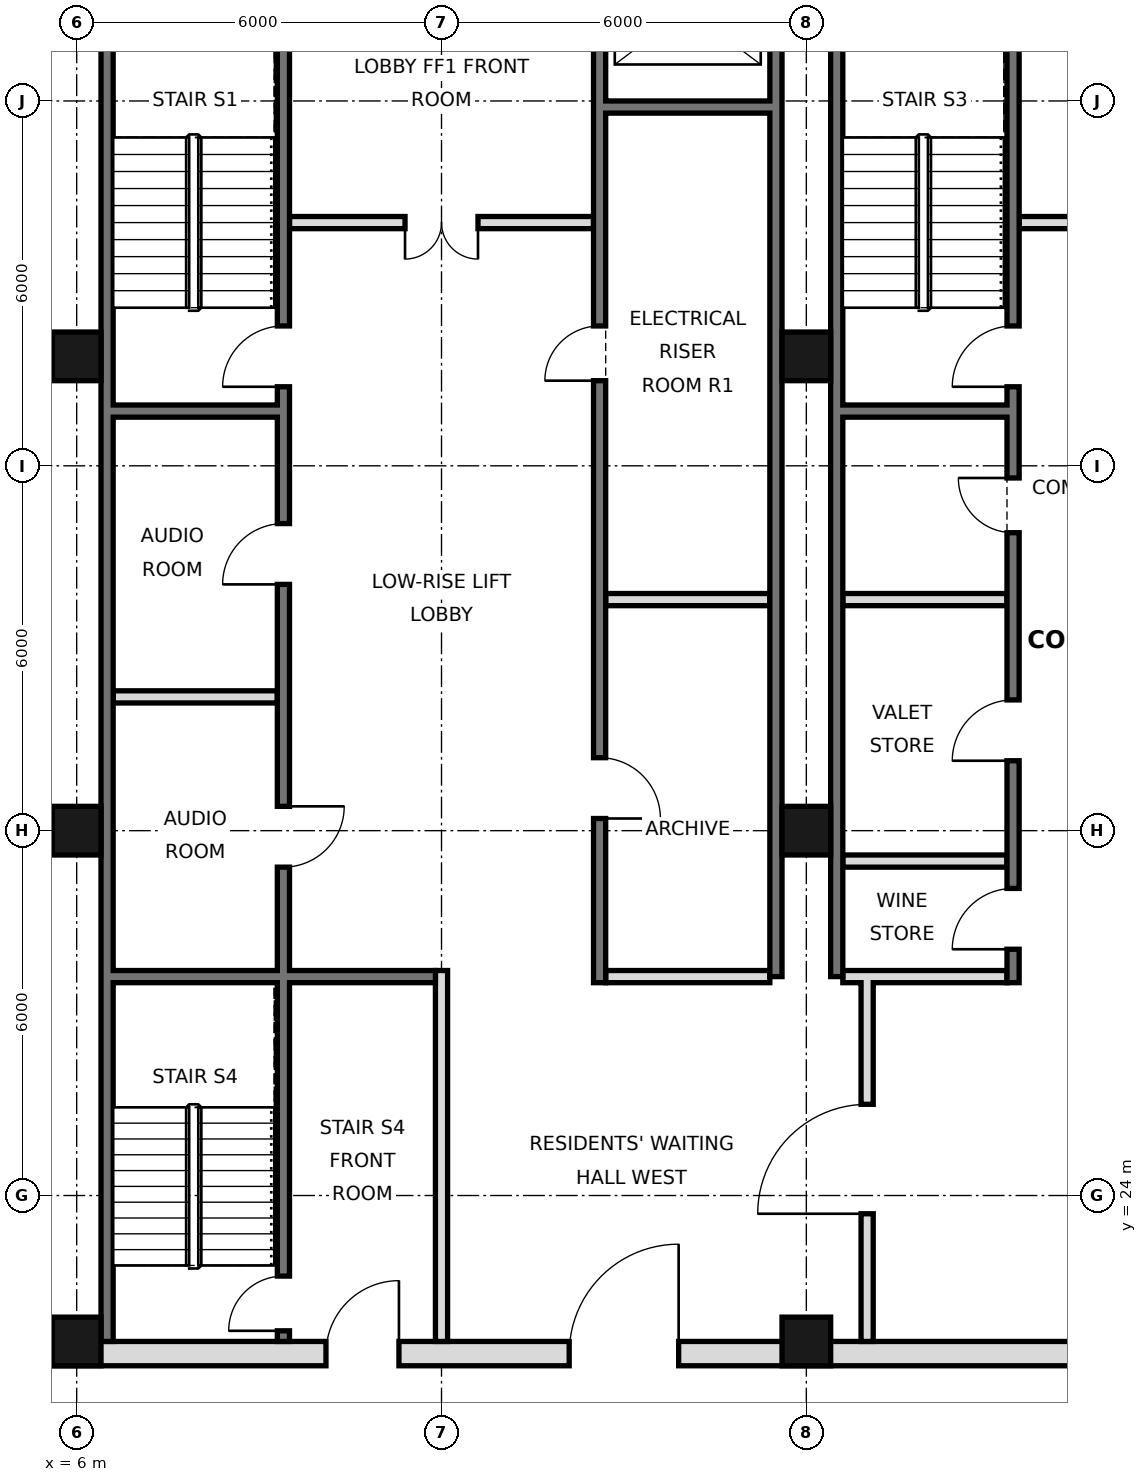
"""IFC4 building model, lengths in metres.
Left out: names, types, materials, properties, quantities, classifications, styles, units other than length and angle.
Written with IfcOpenShell. Run it as: python <this file> out.ifc"""

import sys

from ifc_helpers import new_model, si_unit, direction, frame, frame_2d, origin, origin_2d, place, context, subcontext, project, spatial, rectangle, hollow_rectangle, extrude, element, fill, save


model = new_model("IFC4")
c1 = context("Model", 3, precision=1e-05, world=origin(), true_north=direction((0.0, 1.0)))
c2 = subcontext(c1, "Body", "Model", "MODEL_VIEW")
j1 = project(units=[si_unit("LENGTHUNIT", "METRE"), si_unit("PLANEANGLEUNIT", "RADIAN")], contexts=[c1])
p1 = place(None, origin())
s1 = spatial("IfcSite", under=j1, at=p1, CompositionType="ELEMENT")
p2 = place(p1, origin())
s2 = spatial("IfcBuilding", under=s1, at=p2, CompositionType="ELEMENT")
p3 = place(p2, frame((0.0, 0.0, 239.6)))
s3 = spatial("IfcBuildingStorey", under=s2, at=p3, CompositionType="ELEMENT", Elevation=239.6)
for number, where, z_axis, x_axis in (
    (1, (6.0, 21.6, 0.0), (0.0, 0.0, 1.0), (1.0, 0.0, 0.0)),
    (2, (6.0, 30.0, 0.0), (0.0, 0.0, 1.0), (1.0, 0.0, 0.0)),
    (3, (6.0, 37.8, 0.0), (0.0, 0.0, 1.0), (1.0, 0.0, 0.0)),
    (4, (18.0, 21.6, 0.0), (0.0, 0.0, 1.0), (1.0, 0.0, 0.0)),
    (5, (18.0, 30.0, 0.0), (0.0, 0.0, 1.0), (1.0, 0.0, 0.0)),
    (6, (18.0, 37.8, 0.0), (0.0, 0.0, 1.0), (1.0, 0.0, 0.0)),
):
    element("IfcColumn", number, at=place(p3, frame(where, z_axis=z_axis, x_axis=x_axis)), inside=s3, PredefinedType="COLUMN", context=c2, shape_type="SweptSolid", body=[
        extrude(hollow_rectangle(XDim=0.8, YDim=0.8, WallThickness=0.04, at=origin_2d()), origin(), (0.0, 0.0, 1.0), 3.6),
    ])
p4 = place(p3, frame((6.5, 21.6, 0.0), z_axis=(0.0, 0.0, 1.0), x_axis=(0.0, 1.0, 0.0)))
e7 = element("IfcWall", 7, at=p4, inside=s3, PredefinedType="SOLIDWALL", context=c2, shape_type="SweptSolid", body=[
    extrude(rectangle(XDim=23.5, YDim=0.2, at=frame_2d((11.75, 0.0))), origin(), (0.0, 0.0, 1.0), 3.42),
])
for number, where, z_axis, x_axis in (
    (8, (17.5, 27.6, 0.0), (0.0, 0.0, 1.0), (0.0, 1.0, 0.0)),
    (9, (18.5, 27.6, 0.0), (0.0, 0.0, 1.0), (0.0, 1.0, 0.0)),
):
    element("IfcWall", number, at=place(p3, frame(where, z_axis=z_axis, x_axis=x_axis)), inside=s3, PredefinedType="SOLIDWALL", context=c2, shape_type="SweptSolid", body=[
        extrude(rectangle(XDim=17.5, YDim=0.2, at=frame_2d((8.75, 0.0))), origin(), (0.0, 0.0, 1.0), 3.42),
    ])
p5 = place(p3, frame((5.6, 21.4, 0.0), z_axis=(0.0, 0.0, 1.0), x_axis=(1.0, 0.0, 0.0)))
e10 = element("IfcWall", 10, at=p5, inside=s3, PredefinedType="SOLIDWALL", context=c2, shape_type="SweptSolid", body=[
    extrude(rectangle(XDim=36.8, YDim=0.4, at=frame_2d((18.4, 0.0))), origin(), (0.0, 0.0, 1.0), 3.42),
])
p6 = place(p5, frame((8.5, 0.0, 0.0)))
e11 = element("IfcOpeningElement", 11, at=p6, cuts=e10, PredefinedType="OPENING", context=c2, shape_type="SweptSolid", body=[
    extrude(rectangle(XDim=1.8, YDim=2.1, at=frame_2d((0.9, 1.05))), frame((0.0, 0.21, 0.0), z_axis=(0.0, -1.0, 0.0), x_axis=(1.0, 0.0, 0.0)), (0.0, 0.0, 1.0), 0.42),
])
p7 = place(p5, frame((17.5, 0.0, 0.0)))
e12 = element("IfcOpeningElement", 12, at=p7, cuts=e10, PredefinedType="OPENING", context=c2, shape_type="SweptSolid", body=[
    extrude(rectangle(XDim=1.8, YDim=2.1, at=frame_2d((0.9, 1.05))), frame((0.0, 0.21, 0.0), z_axis=(0.0, -1.0, 0.0), x_axis=(1.0, 0.0, 0.0)), (0.0, 0.0, 1.0), 0.42),
])
p8 = place(p5, frame((26.5, 0.0, 0.0)))
e13 = element("IfcOpeningElement", 13, at=p8, cuts=e10, PredefinedType="OPENING", context=c2, shape_type="SweptSolid", body=[
    extrude(rectangle(XDim=1.8, YDim=2.1, at=frame_2d((0.9, 1.05))), frame((0.0, 0.21, 0.0), z_axis=(0.0, -1.0, 0.0), x_axis=(1.0, 0.0, 0.0)), (0.0, 0.0, 1.0), 0.42),
])
p9 = place(p5, frame((4.5, 0.0, 0.0)))
e14 = element("IfcOpeningElement", 14, at=p9, cuts=e10, PredefinedType="OPENING", context=c2, shape_type="SweptSolid", body=[
    extrude(rectangle(XDim=1.2, YDim=2.1, at=frame_2d((0.6, 1.05))), frame((0.0, 0.21, 0.0), z_axis=(0.0, -1.0, 0.0), x_axis=(1.0, 0.0, 0.0)), (0.0, 0.0, 1.0), 0.42),
])
p10 = place(p5, frame((31.1, 0.0, 0.0)))
e15 = element("IfcOpeningElement", 15, at=p10, cuts=e10, PredefinedType="OPENING", context=c2, shape_type="SweptSolid", body=[
    extrude(rectangle(XDim=1.2, YDim=2.1, at=frame_2d((0.6, 1.05))), frame((0.0, 0.21, 0.0), z_axis=(0.0, -1.0, 0.0), x_axis=(1.0, 0.0, 0.0)), (0.0, 0.0, 1.0), 0.42),
])
p11 = place(p3, frame((19.0, 21.6, 0.0), z_axis=(0.0, 0.0, 1.0), x_axis=(0.0, 1.0, 0.0)))
e16 = element("IfcWall", 16, at=p11, inside=s3, PredefinedType="PARTITIONING", context=c2, shape_type="SweptSolid", body=[
    extrude(rectangle(XDim=6.0, YDim=0.2, at=frame_2d((3.0, 0.0))), origin(), (0.0, 0.0, 1.0), 3.42),
])
p12 = place(p11, frame((2.1, 0.0, 0.0)))
e17 = element("IfcOpeningElement", 17, at=p12, cuts=e16, PredefinedType="OPENING", context=c2, shape_type="SweptSolid", body=[
    extrude(rectangle(XDim=1.8, YDim=2.1, at=frame_2d((0.9, 1.05))), frame((0.0, 0.11, 0.0), z_axis=(0.0, -1.0, 0.0), x_axis=(1.0, 0.0, 0.0)), (0.0, 0.0, 1.0), 0.22),
])
p13 = place(p3, frame((12.0, 21.6, 0.0), z_axis=(0.0, 0.0, 1.0), x_axis=(0.0, 1.0, 0.0)))
e18 = element("IfcWall", 18, at=p13, inside=s3, PredefinedType="PARTITIONING", context=c2, shape_type="SweptSolid", body=[
    extrude(rectangle(XDim=6.1, YDim=0.2, at=frame_2d((3.05, 0.0))), origin(), (0.0, 0.0, 1.0), 3.42),
])
p14 = place(p3, frame((14.6, 27.5, 0.0), z_axis=(0.0, 0.0, 1.0), x_axis=(0.0, 1.0, 0.0)))
e19 = element("IfcWall", 19, at=p14, inside=s3, PredefinedType="SOLIDWALL", context=c2, shape_type="SweptSolid", body=[
    extrude(rectangle(XDim=17.5, YDim=0.2, at=frame_2d((8.75, 0.0))), origin(), (0.0, 0.0, 1.0), 3.42),
])
p15 = place(p14, frame((15.4, 0.0, 0.0)))
e20 = element("IfcOpeningElement", 20, at=p15, cuts=e19, PredefinedType="OPENING", context=c2, shape_type="SweptSolid", body=[
    extrude(rectangle(XDim=1.1, YDim=2.1, at=frame_2d((0.55, 1.05))), frame((0.0, 0.11, 0.0), z_axis=(0.0, -1.0, 0.0), x_axis=(1.0, 0.0, 0.0)), (0.0, 0.0, 1.0), 0.22),
])
p16 = place(p14, frame((2.7, 0.0, 0.0)))
e21 = element("IfcOpeningElement", 21, at=p16, cuts=e19, PredefinedType="OPENING", context=c2, shape_type="SweptSolid", body=[
    extrude(rectangle(XDim=1.0, YDim=2.1, at=frame_2d((0.5, 1.05))), frame((0.0, 0.11, 0.0), z_axis=(0.0, -1.0, 0.0), x_axis=(1.0, 0.0, 0.0)), (0.0, 0.0, 1.0), 0.22),
])
p17 = place(p14, frame((9.9, 0.0, 0.0)))
e22 = element("IfcOpeningElement", 22, at=p17, cuts=e19, PredefinedType="OPENING", context=c2, shape_type="SweptSolid", body=[
    extrude(rectangle(XDim=0.9, YDim=2.1, at=frame_2d((0.45, 1.05))), frame((0.0, 0.11, 0.0), z_axis=(0.0, -1.0, 0.0), x_axis=(1.0, 0.0, 0.0)), (0.0, 0.0, 1.0), 0.22),
])
p18 = place(p3, frame((21.4, 27.5, 0.0), z_axis=(0.0, 0.0, 1.0), x_axis=(0.0, 1.0, 0.0)))
e23 = element("IfcWall", 23, at=p18, inside=s3, PredefinedType="SOLIDWALL", context=c2, shape_type="SweptSolid", body=[
    extrude(rectangle(XDim=17.5, YDim=0.2, at=frame_2d((8.75, 0.0))), origin(), (0.0, 0.0, 1.0), 3.42),
])
p19 = place(p18, frame((0.55, 0.0, 0.0)))
e24 = element("IfcOpeningElement", 24, at=p19, cuts=e23, PredefinedType="OPENING", context=c2, shape_type="SweptSolid", body=[
    extrude(rectangle(XDim=1.0, YDim=2.1, at=frame_2d((0.5, 1.05))), frame((0.0, 0.11, 0.0), z_axis=(0.0, -1.0, 0.0), x_axis=(1.0, 0.0, 0.0)), (0.0, 0.0, 1.0), 0.22),
])
p20 = place(p18, frame((3.65, 0.0, 0.0)))
e25 = element("IfcOpeningElement", 25, at=p20, cuts=e23, PredefinedType="OPENING", context=c2, shape_type="SweptSolid", body=[
    extrude(rectangle(XDim=1.0, YDim=2.1, at=frame_2d((0.5, 1.05))), frame((0.0, 0.11, 0.0), z_axis=(0.0, -1.0, 0.0), x_axis=(1.0, 0.0, 0.0)), (0.0, 0.0, 1.0), 0.22),
])
p21 = place(p18, frame((9.8, 0.0, 0.0)))
e26 = element("IfcOpeningElement", 26, at=p21, cuts=e23, PredefinedType="OPENING", context=c2, shape_type="SweptSolid", body=[
    extrude(rectangle(XDim=1.0, YDim=2.1, at=frame_2d((0.5, 1.05))), frame((0.0, 0.11, 0.0), z_axis=(0.0, -1.0, 0.0), x_axis=(1.0, 0.0, 0.0)), (0.0, 0.0, 1.0), 0.22),
])
p22 = place(p18, frame((7.4, 0.0, 0.0)))
e27 = element("IfcOpeningElement", 27, at=p22, cuts=e23, PredefinedType="OPENING", context=c2, shape_type="SweptSolid", body=[
    extrude(rectangle(XDim=0.9, YDim=2.1, at=frame_2d((0.45, 1.05))), frame((0.0, 0.11, 0.0), z_axis=(0.0, -1.0, 0.0), x_axis=(1.0, 0.0, 0.0)), (0.0, 0.0, 1.0), 0.22),
])
p23 = place(p3, frame((9.4, 21.6, 0.0), z_axis=(0.0, 0.0, 1.0), x_axis=(0.0, 1.0, 0.0)))
e28 = element("IfcWall", 28, at=p23, inside=s3, PredefinedType="SOLIDWALL", context=c2, shape_type="SweptSolid", body=[
    extrude(rectangle(XDim=23.4, YDim=0.2, at=frame_2d((11.7, 0.0))), origin(), (0.0, 0.0, 1.0), 3.42),
])
p24 = place(p23, frame((7.8, 0.0, 0.0)))
e29 = element("IfcOpeningElement", 29, at=p24, cuts=e28, PredefinedType="OPENING", context=c2, shape_type="SweptSolid", body=[
    extrude(rectangle(XDim=1.0, YDim=2.1, at=frame_2d((0.5, 1.05))), frame((0.0, 0.11, 0.0), z_axis=(0.0, -1.0, 0.0), x_axis=(1.0, 0.0, 0.0)), (0.0, 0.0, 1.0), 0.22),
])
p25 = place(p23, frame((12.45, 0.0, 0.0)))
e30 = element("IfcOpeningElement", 30, at=p25, cuts=e28, PredefinedType="OPENING", context=c2, shape_type="SweptSolid", body=[
    extrude(rectangle(XDim=1.0, YDim=2.1, at=frame_2d((0.5, 1.05))), frame((0.0, 0.11, 0.0), z_axis=(0.0, -1.0, 0.0), x_axis=(1.0, 0.0, 0.0)), (0.0, 0.0, 1.0), 0.22),
])
p26 = place(p23, frame((15.7, 0.0, 0.0)))
e31 = element("IfcOpeningElement", 31, at=p26, cuts=e28, PredefinedType="OPENING", context=c2, shape_type="SweptSolid", body=[
    extrude(rectangle(XDim=1.0, YDim=2.1, at=frame_2d((0.5, 1.05))), frame((0.0, 0.11, 0.0), z_axis=(0.0, -1.0, 0.0), x_axis=(1.0, 0.0, 0.0)), (0.0, 0.0, 1.0), 0.22),
])
p27 = place(p23, frame((0.175, 0.0, 0.0)))
e32 = element("IfcOpeningElement", 32, at=p27, cuts=e28, PredefinedType="OPENING", context=c2, shape_type="SweptSolid", body=[
    extrude(rectangle(XDim=0.9, YDim=2.1, at=frame_2d((0.45, 1.05))), frame((0.0, 0.11, 0.0), z_axis=(0.0, -1.0, 0.0), x_axis=(1.0, 0.0, 0.0)), (0.0, 0.0, 1.0), 0.22),
])
for number, where, z_axis, x_axis in (
    (33, (14.7, 27.6, 0.0), (0.0, 0.0, 1.0), (1.0, 0.0, 0.0)),
    (34, (18.6, 27.6, 0.0), (0.0, 0.0, 1.0), (1.0, 0.0, 0.0)),
):
    element("IfcWall", number, at=place(p3, frame(where, z_axis=z_axis, x_axis=x_axis)), inside=s3, PredefinedType="PARTITIONING", context=c2, shape_type="SweptSolid", body=[
        extrude(rectangle(XDim=2.7, YDim=0.2, at=frame_2d((1.35, 0.0))), origin(), (0.0, 0.0, 1.0), 3.42),
    ])
p28 = place(p3, frame((6.6, 27.6, 0.0), z_axis=(0.0, 0.0, 1.0), x_axis=(1.0, 0.0, 0.0)))
e35 = element("IfcWall", 35, at=p28, inside=s3, PredefinedType="SOLIDWALL", context=c2, shape_type="SweptSolid", body=[
    extrude(rectangle(XDim=5.3, YDim=0.2, at=frame_2d((2.65, 0.0))), origin(), (0.0, 0.0, 1.0), 3.42),
])
for number, where, z_axis, x_axis in (
    (36, (18.6, 29.5, 0.0), (0.0, 0.0, 1.0), (1.0, 0.0, 0.0)),
    (37, (6.6, 32.2, 0.0), (0.0, 0.0, 1.0), (1.0, 0.0, 0.0)),
):
    element("IfcWall", number, at=place(p3, frame(where, z_axis=z_axis, x_axis=x_axis)), inside=s3, PredefinedType="PARTITIONING", context=c2, shape_type="SweptSolid", body=[
        extrude(rectangle(XDim=2.7, YDim=0.2, at=frame_2d((1.35, 0.0))), origin(), (0.0, 0.0, 1.0), 3.42),
    ])
for number, where, z_axis, x_axis in (
    (38, (14.7, 33.8, 0.0), (0.0, 0.0, 1.0), (1.0, 0.0, 0.0)),
    (39, (18.6, 33.8, 0.0), (0.0, 0.0, 1.0), (1.0, 0.0, 0.0)),
    (40, (18.6, 36.9, 0.0), (0.0, 0.0, 1.0), (1.0, 0.0, 0.0)),
    (41, (6.6, 36.9, 0.0), (0.0, 0.0, 1.0), (1.0, 0.0, 0.0)),
):
    element("IfcWall", number, at=place(p3, frame(where, z_axis=z_axis, x_axis=x_axis)), inside=s3, PredefinedType="SOLIDWALL", context=c2, shape_type="SweptSolid", body=[
        extrude(rectangle(XDim=2.7, YDim=0.2, at=frame_2d((1.35, 0.0))), origin(), (0.0, 0.0, 1.0), 3.42),
    ])
p29 = place(p3, frame((21.5, 40.0, 0.0), z_axis=(0.0, 0.0, 1.0), x_axis=(1.0, 0.0, 0.0)))
e42 = element("IfcWall", 42, at=p29, inside=s3, PredefinedType="PARTITIONING", context=c2, shape_type="SweptSolid", body=[
    extrude(rectangle(XDim=5.0, YDim=0.2, at=frame_2d((2.5, 0.0))), origin(), (0.0, 0.0, 1.0), 3.42),
])
p30 = place(p29, frame((1.9, 0.0, 0.0)))
e43 = element("IfcOpeningElement", 43, at=p30, cuts=e42, PredefinedType="OPENING", context=c2, shape_type="SweptSolid", body=[
    extrude(rectangle(XDim=1.2, YDim=2.1, at=frame_2d((0.6, 1.05))), frame((0.0, 0.11, 0.0), z_axis=(0.0, -1.0, 0.0), x_axis=(1.0, 0.0, 0.0)), (0.0, 0.0, 1.0), 0.22),
])
p31 = place(p3, frame((9.5, 40.0, 0.0), z_axis=(0.0, 0.0, 1.0), x_axis=(1.0, 0.0, 0.0)))
e44 = element("IfcWall", 44, at=p31, inside=s3, PredefinedType="PARTITIONING", context=c2, shape_type="SweptSolid", body=[
    extrude(rectangle(XDim=5.0, YDim=0.2, at=frame_2d((2.5, 0.0))), origin(), (0.0, 0.0, 1.0), 3.42),
])
p32 = place(p31, frame((1.9, 0.0, 0.0)))
e45 = element("IfcOpeningElement", 45, at=p32, cuts=e44, PredefinedType="OPENING", context=c2, shape_type="SweptSolid", body=[
    extrude(rectangle(XDim=1.2, YDim=2.1, at=frame_2d((0.6, 1.05))), frame((0.0, 0.11, 0.0), z_axis=(0.0, -1.0, 0.0), x_axis=(1.0, 0.0, 0.0)), (0.0, 0.0, 1.0), 0.22),
])
p33 = place(p3, frame((14.7, 41.9, 0.0), z_axis=(0.0, 0.0, 1.0), x_axis=(1.0, 0.0, 0.0)))
e46 = element("IfcWall", 46, at=p33, inside=s3, PredefinedType="SOLIDWALL", context=c2, shape_type="SweptSolid", body=[
    extrude(rectangle(XDim=2.7, YDim=0.2, at=frame_2d((1.35, 0.0))), origin(), (0.0, 0.0, 1.0), 3.42),
])
p34 = place(p6, frame((1.8, 0.0, 0.0), z_axis=(0.0, 0.0, 1.0), x_axis=(-1.0, 0.0, 0.0)))
e47 = element("IfcDoor", 47, at=p34, inside=s3, OperationType="SINGLE_SWING_LEFT", PredefinedType="DOOR", context=c2, shape_type="SweptSolid", body=[
    extrude(rectangle(XDim=1.8, YDim=2.1, at=frame_2d((0.9, 1.05))), frame((0.0, 0.025, 0.0), z_axis=(0.0, -1.0, 0.0), x_axis=(1.0, 0.0, 0.0)), (0.0, 0.0, 1.0), 0.05),
])
fill(e11, e47)
p35 = place(p12, origin())
e48 = element("IfcDoor", 48, at=p35, inside=s3, OperationType="SINGLE_SWING_LEFT", PredefinedType="DOOR", context=c2, shape_type="SweptSolid", body=[
    extrude(rectangle(XDim=1.8, YDim=2.1, at=frame_2d((0.9, 1.05))), frame((0.0, 0.025, 0.0), z_axis=(0.0, -1.0, 0.0), x_axis=(1.0, 0.0, 0.0)), (0.0, 0.0, 1.0), 0.05),
])
fill(e17, e48)
p36 = place(p9, frame((1.2, 0.0, 0.0), z_axis=(0.0, 0.0, 1.0), x_axis=(-1.0, 0.0, 0.0)))
e49 = element("IfcDoor", 49, at=p36, inside=s3, OperationType="SINGLE_SWING_LEFT", PredefinedType="DOOR", context=c2, shape_type="SweptSolid", body=[
    extrude(rectangle(XDim=1.2, YDim=2.1, at=frame_2d((0.6, 1.05))), frame((0.0, 0.025, 0.0), z_axis=(0.0, -1.0, 0.0), x_axis=(1.0, 0.0, 0.0)), (0.0, 0.0, 1.0), 0.05),
])
fill(e14, e49)
p37 = place(p32, frame((1.2, 0.0, 0.0), z_axis=(0.0, 0.0, 1.0), x_axis=(-1.0, 0.0, 0.0)))
e50 = element("IfcDoor", 50, at=p37, inside=s3, OperationType="DOUBLE_DOOR_SINGLE_SWING", PredefinedType="DOOR", context=c2, shape_type="SweptSolid", body=[
    extrude(rectangle(XDim=1.2, YDim=2.1, at=frame_2d((0.6, 1.05))), frame((0.0, 0.025, 0.0), z_axis=(0.0, -1.0, 0.0), x_axis=(1.0, 0.0, 0.0)), (0.0, 0.0, 1.0), 0.05),
])
fill(e45, e50)
p38 = place(p19, origin())
e51 = element("IfcDoor", 51, at=p38, inside=s3, OperationType="SINGLE_SWING_LEFT", PredefinedType="DOOR", context=c2, shape_type="SweptSolid", body=[
    extrude(rectangle(XDim=1.0, YDim=2.1, at=frame_2d((0.5, 1.05))), frame((0.0, 0.025, 0.0), z_axis=(0.0, -1.0, 0.0), x_axis=(1.0, 0.0, 0.0)), (0.0, 0.0, 1.0), 0.05),
])
fill(e24, e51)
p39 = place(p20, origin())
e52 = element("IfcDoor", 52, at=p39, inside=s3, OperationType="SINGLE_SWING_LEFT", PredefinedType="DOOR", context=c2, shape_type="SweptSolid", body=[
    extrude(rectangle(XDim=1.0, YDim=2.1, at=frame_2d((0.5, 1.05))), frame((0.0, 0.025, 0.0), z_axis=(0.0, -1.0, 0.0), x_axis=(1.0, 0.0, 0.0)), (0.0, 0.0, 1.0), 0.05),
])
fill(e25, e52)
p40 = place(p16, frame((1.0, 0.0, 0.0), z_axis=(0.0, 0.0, 1.0), x_axis=(-1.0, 0.0, 0.0)))
e53 = element("IfcDoor", 53, at=p40, inside=s3, OperationType="SINGLE_SWING_RIGHT", PredefinedType="DOOR", context=c2, shape_type="SweptSolid", body=[
    extrude(rectangle(XDim=1.0, YDim=2.1, at=frame_2d((0.5, 1.05))), frame((0.0, 0.025, 0.0), z_axis=(0.0, -1.0, 0.0), x_axis=(1.0, 0.0, 0.0)), (0.0, 0.0, 1.0), 0.05),
])
fill(e21, e53)
p41 = place(p24, origin())
e54 = element("IfcDoor", 54, at=p41, inside=s3, OperationType="SINGLE_SWING_RIGHT", PredefinedType="DOOR", context=c2, shape_type="SweptSolid", body=[
    extrude(rectangle(XDim=1.0, YDim=2.1, at=frame_2d((0.5, 1.05))), frame((0.0, 0.025, 0.0), z_axis=(0.0, -1.0, 0.0), x_axis=(1.0, 0.0, 0.0)), (0.0, 0.0, 1.0), 0.05),
])
fill(e29, e54)
p42 = place(p25, origin())
e55 = element("IfcDoor", 55, at=p42, inside=s3, OperationType="SINGLE_SWING_LEFT", PredefinedType="DOOR", context=c2, shape_type="SweptSolid", body=[
    extrude(rectangle(XDim=1.0, YDim=2.1, at=frame_2d((0.5, 1.05))), frame((0.0, 0.025, 0.0), z_axis=(0.0, -1.0, 0.0), x_axis=(1.0, 0.0, 0.0)), (0.0, 0.0, 1.0), 0.05),
])
fill(e30, e55)
p43 = place(p26, origin())
e56 = element("IfcDoor", 56, at=p43, inside=s3, OperationType="SINGLE_SWING_LEFT", PredefinedType="DOOR", context=c2, shape_type="SweptSolid", body=[
    extrude(rectangle(XDim=1.0, YDim=2.1, at=frame_2d((0.5, 1.05))), frame((0.0, 0.025, 0.0), z_axis=(0.0, -1.0, 0.0), x_axis=(1.0, 0.0, 0.0)), (0.0, 0.0, 1.0), 0.05),
])
fill(e31, e56)
p44 = place(p21, origin())
e57 = element("IfcDoor", 57, at=p44, inside=s3, OperationType="SINGLE_SWING_LEFT", PredefinedType="DOOR", context=c2, shape_type="SweptSolid", body=[
    extrude(rectangle(XDim=1.0, YDim=2.1, at=frame_2d((0.5, 1.05))), frame((0.0, 0.025, 0.0), z_axis=(0.0, -1.0, 0.0), x_axis=(1.0, 0.0, 0.0)), (0.0, 0.0, 1.0), 0.05),
])
fill(e26, e57)
p45 = place(p27, origin())
e58 = element("IfcDoor", 58, at=p45, inside=s3, OperationType="SINGLE_SWING_LEFT", PredefinedType="DOOR", context=c2, shape_type="SweptSolid", body=[
    extrude(rectangle(XDim=0.9, YDim=2.1, at=frame_2d((0.45, 1.05))), frame((0.0, 0.025, 0.0), z_axis=(0.0, -1.0, 0.0), x_axis=(1.0, 0.0, 0.0)), (0.0, 0.0, 1.0), 0.05),
])
fill(e32, e58)
p46 = place(p17, origin())
e59 = element("IfcDoor", 59, at=p46, inside=s3, OperationType="SINGLE_SWING_LEFT", PredefinedType="DOOR", context=c2, shape_type="SweptSolid", body=[
    extrude(rectangle(XDim=0.9, YDim=2.1, at=frame_2d((0.45, 1.05))), frame((0.0, 0.025, 0.0), z_axis=(0.0, -1.0, 0.0), x_axis=(1.0, 0.0, 0.0)), (0.0, 0.0, 1.0), 0.05),
])
fill(e22, e59)
p47 = place(p22, frame((0.9, 0.0, 0.0), z_axis=(0.0, 0.0, 1.0), x_axis=(-1.0, 0.0, 0.0)))
e60 = element("IfcDoor", 60, at=p47, inside=s3, OperationType="SINGLE_SWING_LEFT", PredefinedType="DOOR", context=c2, shape_type="SweptSolid", body=[
    extrude(rectangle(XDim=0.9, YDim=2.1, at=frame_2d((0.45, 1.05))), frame((0.0, 0.025, 0.0), z_axis=(0.0, -1.0, 0.0), x_axis=(1.0, 0.0, 0.0)), (0.0, 0.0, 1.0), 0.05),
])
fill(e27, e60)
save(model, sys.argv[1])
